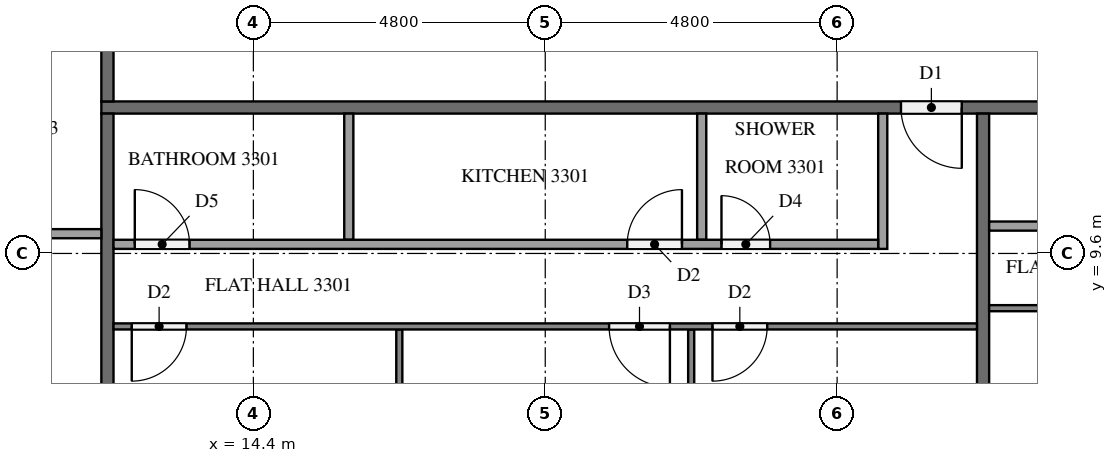
"""IFC4 building model, lengths in metres.
Left out: names, types, materials, properties, quantities, classifications, styles, units other than length and angle.
Written with IfcOpenShell. Run it as: python <this file> out.ifc"""

import sys

from ifc_helpers import new_model, si_unit, direction, frame, frame_2d, origin, place, context, subcontext, project, spatial, rectangle, extrude, element, fill, save


model = new_model("IFC4")
c1 = context("Model", 3, precision=1e-05, world=origin(), true_north=direction((0.0, 1.0)))
c2 = subcontext(c1, "Body", "Model", "MODEL_VIEW")
j1 = project(units=[si_unit("LENGTHUNIT", "METRE"), si_unit("PLANEANGLEUNIT", "RADIAN")], contexts=[c1])
p1 = place(None, origin())
s1 = spatial("IfcSite", under=j1, at=p1, CompositionType="ELEMENT")
p2 = place(p1, origin())
s2 = spatial("IfcBuilding", under=s1, at=p2, CompositionType="ELEMENT")
p3 = place(p2, frame((0.0, 0.0, 129.6)))
s3 = spatial("IfcBuildingStorey", under=s2, at=p3, CompositionType="ELEMENT", Elevation=129.6)
p4 = place(p3, frame((50.5, 12.0, 0.0), z_axis=(0.0, 0.0, 1.0), x_axis=(-1.0, 0.0, 0.0)))
e1 = element("IfcWall", 1, at=p4, inside=s3, PredefinedType="PARTITIONING", context=c2, shape_type="SweptSolid", body=[
    extrude(rectangle(XDim=38.6, YDim=0.2, at=frame_2d((19.3, 0.0))), origin(), (0.0, 0.0, 1.0), 3.2),
])
p5 = place(p4, frame((24.45, 0.0, 0.0)))
e2 = element("IfcOpeningElement", 2, at=p5, cuts=e1, PredefinedType="OPENING", context=c2, shape_type="SweptSolid", body=[
    extrude(rectangle(XDim=1.0, YDim=2.1, at=frame_2d((0.5, 1.05))), frame((0.0, 0.11, 0.0), z_axis=(0.0, -1.0, 0.0), x_axis=(1.0, 0.0, 0.0)), (0.0, 0.0, 1.0), 0.22),
])
p6 = place(p4, frame((10.05, 0.0, 0.0)))
e3 = element("IfcOpeningElement", 3, at=p6, cuts=e1, PredefinedType="OPENING", context=c2, shape_type="SweptSolid", body=[
    extrude(rectangle(XDim=1.0, YDim=2.1, at=frame_2d((0.5, 1.05))), frame((0.0, 0.11, 0.0), z_axis=(0.0, -1.0, 0.0), x_axis=(1.0, 0.0, 0.0)), (0.0, 0.0, 1.0), 0.22),
])
p7 = place(p4, frame((8.35, 0.0, 0.0)))
e4 = element("IfcOpeningElement", 4, at=p7, cuts=e1, PredefinedType="OPENING", context=c2, shape_type="SweptSolid", body=[
    extrude(rectangle(XDim=1.0, YDim=2.1, at=frame_2d((0.5, 1.05))), frame((0.0, 0.11, 0.0), z_axis=(0.0, -1.0, 0.0), x_axis=(1.0, 0.0, 0.0)), (0.0, 0.0, 1.0), 0.22),
])
p8 = place(p3, frame((12.0, 12.1, 0.0), z_axis=(0.0, 0.0, 1.0), x_axis=(0.0, 1.0, 0.0)))
e5 = element("IfcWall", 5, at=p8, inside=s3, PredefinedType="PARTITIONING", context=c2, shape_type="SweptSolid", body=[
    extrude(rectangle(XDim=2.8, YDim=0.2, at=frame_2d((1.4, 0.0))), origin(), (0.0, 0.0, 1.0), 3.2),
])
p9 = place(p8, frame((1.55, 0.0, 0.0)))
e6 = element("IfcOpeningElement", 6, at=p9, cuts=e5, PredefinedType="OPENING", context=c2, shape_type="SweptSolid", body=[
    extrude(rectangle(XDim=1.0, YDim=2.1, at=frame_2d((0.5, 1.05))), frame((0.0, 0.11, 0.0), z_axis=(0.0, -1.0, 0.0), x_axis=(1.0, 0.0, 0.0)), (0.0, 0.0, 1.0), 0.22),
])
for number, where, z_axis, x_axis in (
    (7, (26.4, 11.9, 0.0), (0.0, 0.0, 1.0), (0.0, -1.0, 0.0)),
    (8, (12.0, 4.9, 0.0), (0.0, 0.0, 1.0), (0.0, 1.0, 0.0)),
):
    element("IfcWall", number, at=place(p3, frame(where, z_axis=z_axis, x_axis=x_axis)), inside=s3, PredefinedType="PARTITIONING", context=c2, shape_type="SweptSolid", body=[
        extrude(rectangle(XDim=7.0, YDim=0.2, at=frame_2d((3.5, 0.0))), origin(), (0.0, 0.0, 1.0), 3.2),
    ])
for number, where, z_axis, x_axis in (
    (9, (21.6, 8.35, 0.0), (0.0, 0.0, 1.0), (0.0, -1.0, 0.0)),
    (10, (16.8, 8.35, 0.0), (0.0, 0.0, 1.0), (0.0, -1.0, 0.0)),
):
    element("IfcWall", number, at=place(p3, frame(where, z_axis=z_axis, x_axis=x_axis)), inside=s3, PredefinedType="PARTITIONING", context=c2, shape_type="SweptSolid", body=[
        extrude(rectangle(XDim=3.45, YDim=0.1, at=frame_2d((1.725, 0.0))), origin(), (0.0, 0.0, 1.0), 3.2),
    ])
p10 = place(p3, frame((26.3, 8.4, 0.0), z_axis=(0.0, 0.0, 1.0), x_axis=(-1.0, 0.0, 0.0)))
e11 = element("IfcWall", 11, at=p10, inside=s3, PredefinedType="PARTITIONING", context=c2, shape_type="SweptSolid", body=[
    extrude(rectangle(XDim=14.2, YDim=0.1, at=frame_2d((7.1, 0.0))), origin(), (0.0, 0.0, 1.0), 3.2),
])
p11 = place(p10, frame((3.45, 0.0, 0.0)))
e12 = element("IfcOpeningElement", 12, at=p11, cuts=e11, PredefinedType="OPENING", context=c2, shape_type="SweptSolid", body=[
    extrude(rectangle(XDim=0.9, YDim=2.1, at=frame_2d((0.45, 1.05))), frame((0.0, 0.06, 0.0), z_axis=(0.0, -1.0, 0.0), x_axis=(1.0, 0.0, 0.0)), (0.0, 0.0, 1.0), 0.12),
])
p12 = place(p10, frame((5.05, 0.0, 0.0)))
e13 = element("IfcOpeningElement", 13, at=p12, cuts=e11, PredefinedType="OPENING", context=c2, shape_type="SweptSolid", body=[
    extrude(rectangle(XDim=1.0, YDim=2.1, at=frame_2d((0.5, 1.05))), frame((0.0, 0.06, 0.0), z_axis=(0.0, -1.0, 0.0), x_axis=(1.0, 0.0, 0.0)), (0.0, 0.0, 1.0), 0.12),
])
p13 = place(p10, frame((13.0, 0.0, 0.0)))
e14 = element("IfcOpeningElement", 14, at=p13, cuts=e11, PredefinedType="OPENING", context=c2, shape_type="SweptSolid", body=[
    extrude(rectangle(XDim=0.9, YDim=2.1, at=frame_2d((0.45, 1.05))), frame((0.0, 0.06, 0.0), z_axis=(0.0, -1.0, 0.0), x_axis=(1.0, 0.0, 0.0)), (0.0, 0.0, 1.0), 0.12),
])
for number, where, z_axis, x_axis in (
    (15, (21.773, 11.9, 0.0), (0.0, 0.0, 1.0), (0.0, -1.0, 0.0)),
    (16, (15.969, 11.9, 0.0), (0.0, 0.0, 1.0), (0.0, -1.0, 0.0)),
):
    element("IfcWall", number, at=place(p3, frame(where, z_axis=z_axis, x_axis=x_axis)), inside=s3, PredefinedType="PARTITIONING", context=c2, shape_type="SweptSolid", body=[
        extrude(rectangle(XDim=2.075, YDim=0.15, at=frame_2d((1.038, 0.0))), origin(), (0.0, 0.0, 1.0), 3.2),
    ])
p14 = place(p3, frame((24.75, 11.9, 0.0), z_axis=(0.0, 0.0, 1.0), x_axis=(0.0, -1.0, 0.0)))
e17 = element("IfcWall", 17, at=p14, inside=s3, PredefinedType="PARTITIONING", context=c2, shape_type="SweptSolid", body=[
    extrude(rectangle(XDim=2.225, YDim=0.15, at=frame_2d((1.112, 0.0))), origin(), (0.0, 0.0, 1.0), 3.2),
])
p15 = place(p3, frame((12.1, 9.75, 0.0), z_axis=(0.0, 0.0, 1.0), x_axis=(1.0, 0.0, 0.0)))
e18 = element("IfcWall", 18, at=p15, inside=s3, PredefinedType="PARTITIONING", context=c2, shape_type="SweptSolid", body=[
    extrude(rectangle(XDim=12.575, YDim=0.15, at=frame_2d((6.288, 0.0))), origin(), (0.0, 0.0, 1.0), 3.2),
])
p16 = place(p15, frame((9.998, 0.0, 0.0)))
e19 = element("IfcOpeningElement", 19, at=p16, cuts=e18, PredefinedType="OPENING", context=c2, shape_type="SweptSolid", body=[
    extrude(rectangle(XDim=0.8, YDim=2.1, at=frame_2d((0.4, 1.05))), frame((0.0, 0.085, 0.0), z_axis=(0.0, -1.0, 0.0), x_axis=(1.0, 0.0, 0.0)), (0.0, 0.0, 1.0), 0.17),
])
p17 = place(p15, frame((8.448, 0.0, 0.0)))
e20 = element("IfcOpeningElement", 20, at=p17, cuts=e18, PredefinedType="OPENING", context=c2, shape_type="SweptSolid", body=[
    extrude(rectangle(XDim=0.9, YDim=2.1, at=frame_2d((0.45, 1.05))), frame((0.0, 0.085, 0.0), z_axis=(0.0, -1.0, 0.0), x_axis=(1.0, 0.0, 0.0)), (0.0, 0.0, 1.0), 0.17),
])
p18 = place(p15, frame((0.35, 0.0, 0.0)))
e21 = element("IfcOpeningElement", 21, at=p18, cuts=e18, PredefinedType="OPENING", context=c2, shape_type="SweptSolid", body=[
    extrude(rectangle(XDim=0.9, YDim=2.1, at=frame_2d((0.45, 1.05))), frame((0.0, 0.085, 0.0), z_axis=(0.0, -1.0, 0.0), x_axis=(1.0, 0.0, 0.0)), (0.0, 0.0, 1.0), 0.17),
])
p19 = place(p3, frame((40.7, 8.7, 0.0), z_axis=(0.0, 0.0, 1.0), x_axis=(-1.0, 0.0, 0.0)))
e22 = element("IfcWall", 22, at=p19, inside=s3, PredefinedType="PARTITIONING", context=c2, shape_type="SweptSolid", body=[
    extrude(rectangle(XDim=14.2, YDim=0.1, at=frame_2d((7.1, 0.0))), origin(), (0.0, 0.0, 1.0), 3.2),
])
p20 = place(p19, frame((0.3, 0.0, 0.0)))
e23 = element("IfcOpeningElement", 23, at=p20, cuts=e22, PredefinedType="OPENING", context=c2, shape_type="SweptSolid", body=[
    extrude(rectangle(XDim=0.9, YDim=2.1, at=frame_2d((0.45, 1.05))), frame((0.0, 0.06, 0.0), z_axis=(0.0, -1.0, 0.0), x_axis=(1.0, 0.0, 0.0)), (0.0, 0.0, 1.0), 0.12),
])
p21 = place(p19, frame((8.15, 0.0, 0.0)))
e24 = element("IfcOpeningElement", 24, at=p21, cuts=e22, PredefinedType="OPENING", context=c2, shape_type="SweptSolid", body=[
    extrude(rectangle(XDim=1.0, YDim=2.1, at=frame_2d((0.5, 1.05))), frame((0.0, 0.06, 0.0), z_axis=(0.0, -1.0, 0.0), x_axis=(1.0, 0.0, 0.0)), (0.0, 0.0, 1.0), 0.12),
])
p22 = place(p19, frame((9.85, 0.0, 0.0)))
e25 = element("IfcOpeningElement", 25, at=p22, cuts=e22, PredefinedType="OPENING", context=c2, shape_type="SweptSolid", body=[
    extrude(rectangle(XDim=0.9, YDim=2.1, at=frame_2d((0.45, 1.05))), frame((0.0, 0.06, 0.0), z_axis=(0.0, -1.0, 0.0), x_axis=(1.0, 0.0, 0.0)), (0.0, 0.0, 1.0), 0.12),
])
p23 = place(p3, frame((26.5, 10.05, 0.0), z_axis=(0.0, 0.0, 1.0), x_axis=(1.0, 0.0, 0.0)))
e26 = element("IfcWall", 26, at=p23, inside=s3, PredefinedType="PARTITIONING", context=c2, shape_type="SweptSolid", body=[
    extrude(rectangle(XDim=12.575, YDim=0.15, at=frame_2d((6.288, 0.0))), origin(), (0.0, 0.0, 1.0), 3.2),
])
p24 = place(p23, frame((11.475, 0.0, 0.0)))
e27 = element("IfcOpeningElement", 27, at=p24, cuts=e26, PredefinedType="OPENING", context=c2, shape_type="SweptSolid", body=[
    extrude(rectangle(XDim=0.8, YDim=2.1, at=frame_2d((0.4, 1.05))), frame((0.0, 0.085, 0.0), z_axis=(0.0, -1.0, 0.0), x_axis=(1.0, 0.0, 0.0)), (0.0, 0.0, 1.0), 0.17),
])
p25 = place(p23, frame((6.129, 0.0, 0.0)))
e28 = element("IfcOpeningElement", 28, at=p25, cuts=e26, PredefinedType="OPENING", context=c2, shape_type="SweptSolid", body=[
    extrude(rectangle(XDim=0.9, YDim=2.1, at=frame_2d((0.45, 1.05))), frame((0.0, 0.085, 0.0), z_axis=(0.0, -1.0, 0.0), x_axis=(1.0, 0.0, 0.0)), (0.0, 0.0, 1.0), 0.17),
])
p26 = place(p23, frame((4.579, 0.0, 0.0)))
e29 = element("IfcOpeningElement", 29, at=p26, cuts=e26, PredefinedType="OPENING", context=c2, shape_type="SweptSolid", body=[
    extrude(rectangle(XDim=0.9, YDim=2.1, at=frame_2d((0.45, 1.05))), frame((0.0, 0.085, 0.0), z_axis=(0.0, -1.0, 0.0), x_axis=(1.0, 0.0, 0.0)), (0.0, 0.0, 1.0), 0.17),
])
p27 = place(p3, frame((11.9, 9.925, 0.0), z_axis=(0.0, 0.0, 1.0), x_axis=(-1.0, 0.0, 0.0)))
e30 = element("IfcWall", 30, at=p27, inside=s3, PredefinedType="PARTITIONING", context=c2, shape_type="SweptSolid", body=[
    extrude(rectangle(XDim=3.875, YDim=0.15, at=frame_2d((1.938, 0.0))), origin(), (0.0, 0.0, 1.0), 3.2),
])
p28 = place(p5, origin())
e31 = element("IfcDoor", 31, at=p28, inside=s3, OperationType="SINGLE_SWING_LEFT", PredefinedType="DOOR", context=c2, shape_type="SweptSolid", body=[
    extrude(rectangle(XDim=1.0, YDim=2.1, at=frame_2d((0.5, 1.05))), frame((0.0, 0.025, 0.0), z_axis=(0.0, -1.0, 0.0), x_axis=(1.0, 0.0, 0.0)), (0.0, 0.0, 1.0), 0.05),
])
fill(e2, e31)
p29 = place(p11, origin())
e32 = element("IfcDoor", 32, at=p29, inside=s3, OperationType="SINGLE_SWING_RIGHT", PredefinedType="DOOR", context=c2, shape_type="SweptSolid", body=[
    extrude(rectangle(XDim=0.9, YDim=2.1, at=frame_2d((0.45, 1.05))), frame((0.0, 0.025, 0.0), z_axis=(0.0, -1.0, 0.0), x_axis=(1.0, 0.0, 0.0)), (0.0, 0.0, 1.0), 0.05),
])
fill(e12, e32)
p30 = place(p12, origin())
e33 = element("IfcDoor", 33, at=p30, inside=s3, OperationType="SINGLE_SWING_LEFT", PredefinedType="DOOR", context=c2, shape_type="SweptSolid", body=[
    extrude(rectangle(XDim=1.0, YDim=2.1, at=frame_2d((0.5, 1.05))), frame((0.0, 0.025, 0.0), z_axis=(0.0, -1.0, 0.0), x_axis=(1.0, 0.0, 0.0)), (0.0, 0.0, 1.0), 0.05),
])
fill(e13, e33)
p31 = place(p13, origin())
e34 = element("IfcDoor", 34, at=p31, inside=s3, OperationType="SINGLE_SWING_RIGHT", PredefinedType="DOOR", context=c2, shape_type="SweptSolid", body=[
    extrude(rectangle(XDim=0.9, YDim=2.1, at=frame_2d((0.45, 1.05))), frame((0.0, 0.025, 0.0), z_axis=(0.0, -1.0, 0.0), x_axis=(1.0, 0.0, 0.0)), (0.0, 0.0, 1.0), 0.05),
])
fill(e14, e34)
p32 = place(p16, origin())
e35 = element("IfcDoor", 35, at=p32, inside=s3, OperationType="SINGLE_SWING_LEFT", PredefinedType="DOOR", context=c2, shape_type="SweptSolid", body=[
    extrude(rectangle(XDim=0.8, YDim=2.1, at=frame_2d((0.4, 1.05))), frame((0.0, 0.025, 0.0), z_axis=(0.0, -1.0, 0.0), x_axis=(1.0, 0.0, 0.0)), (0.0, 0.0, 1.0), 0.05),
])
fill(e19, e35)
p33 = place(p17, origin())
e36 = element("IfcDoor", 36, at=p33, inside=s3, OperationType="SINGLE_SWING_RIGHT", PredefinedType="DOOR", context=c2, shape_type="SweptSolid", body=[
    extrude(rectangle(XDim=0.9, YDim=2.1, at=frame_2d((0.45, 1.05))), frame((0.0, 0.025, 0.0), z_axis=(0.0, -1.0, 0.0), x_axis=(1.0, 0.0, 0.0)), (0.0, 0.0, 1.0), 0.05),
])
fill(e20, e36)
p34 = place(p18, origin())
e37 = element("IfcDoor", 37, at=p34, inside=s3, OperationType="SINGLE_SWING_LEFT", PredefinedType="DOOR", context=c2, shape_type="SweptSolid", body=[
    extrude(rectangle(XDim=0.9, YDim=2.1, at=frame_2d((0.45, 1.05))), frame((0.0, 0.025, 0.0), z_axis=(0.0, -1.0, 0.0), x_axis=(1.0, 0.0, 0.0)), (0.0, 0.0, 1.0), 0.05),
])
fill(e21, e37)
save(model, sys.argv[1])
